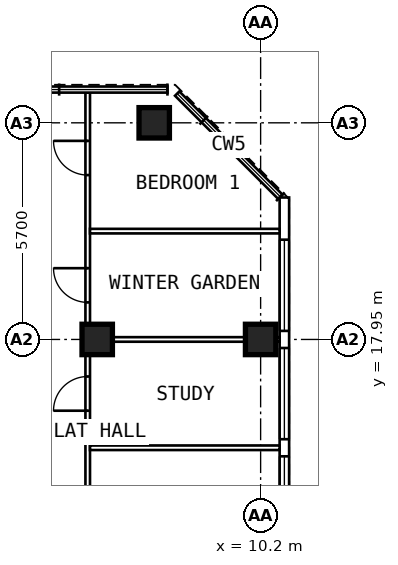
"""IFC4 building model, lengths in metres.
Left out: names, types, materials, properties, quantities, classifications, styles, units other than length and angle.
Written with IfcOpenShell. Run it as: python <this file> out.ifc"""

import sys

from ifc_helpers import new_model, si_unit, direction, frame, frame_2d, origin, origin_2d, place, context, subcontext, project, spatial, rectangle, extrude, element, fill, save


model = new_model("IFC4")
c1 = context("Model", 3, precision=1e-05, world=origin(), true_north=direction((0.0, 1.0)))
c2 = subcontext(c1, "Body", "Model", "MODEL_VIEW")
j1 = project(units=[si_unit("LENGTHUNIT", "METRE"), si_unit("PLANEANGLEUNIT", "RADIAN")], contexts=[c1])
p1 = place(None, origin())
s1 = spatial("IfcSite", under=j1, at=p1, CompositionType="ELEMENT")
p2 = place(p1, origin())
s2 = spatial("IfcBuilding", under=s1, at=p2, CompositionType="ELEMENT")
p3 = place(p2, frame((0.0, 0.0, 296.2)))
s3 = spatial("IfcBuildingStorey", under=s2, at=p3, CompositionType="ELEMENT", Elevation=296.2)
for number, where, z_axis, x_axis in (
    (1, (10.2, 17.95, 0.0), (0.0, 0.0, 1.0), (0.0, 1.0, 0.0)),
    (2, (7.4, 23.65, 0.0), (0.0, 0.0, 1.0), (0.0, 1.0, 0.0)),
    (3, (5.9, 17.95, 0.0), (0.0, 0.0, 1.0), (0.0, 1.0, 0.0)),
):
    element("IfcColumn", number, at=place(p3, frame(where, z_axis=z_axis, x_axis=x_axis)), inside=s3, PredefinedType="COLUMN", context=c2, shape_type="SweptSolid", body=[
        extrude(rectangle(XDim=0.8, YDim=0.8, at=origin_2d()), origin(), (0.0, 0.0, 1.0), 4.8),
    ])
p4 = place(p3, frame((10.825, 6.409, 0.0), z_axis=(0.0, 0.0, 1.0), x_axis=(0.0, 1.0, 0.0)))
e4 = element("IfcWall", 4, at=p4, inside=s3, PredefinedType="SOLIDWALL", context=c2, shape_type="SweptSolid", body=[
    extrude(rectangle(XDim=15.276, YDim=0.25, at=frame_2d((7.638, 0.0))), origin(), (0.0, 0.0, 1.0), 4.5),
])
p5 = place(p4, frame((0.366, 0.0, 0.6)))
e5 = element("IfcOpeningElement", 5, at=p5, cuts=e4, PredefinedType="OPENING", context=c2, shape_type="SweptSolid", body=[
    extrude(rectangle(XDim=2.4, YDim=2.0, at=frame_2d((1.2, 1.0))), frame((0.0, 0.137, 0.0), z_axis=(0.0, -1.0, 0.0), x_axis=(1.0, 0.0, 0.0)), (0.0, 0.0, 1.0), 0.274),
])
p6 = place(p4, frame((3.216, 0.0, 0.6)))
e6 = element("IfcOpeningElement", 6, at=p6, cuts=e4, PredefinedType="OPENING", context=c2, shape_type="SweptSolid", body=[
    extrude(rectangle(XDim=2.4, YDim=2.0, at=frame_2d((1.2, 1.0))), frame((0.0, 0.137, 0.0), z_axis=(0.0, -1.0, 0.0), x_axis=(1.0, 0.0, 0.0)), (0.0, 0.0, 1.0), 0.274),
])
p7 = place(p4, frame((6.066, 0.0, 0.6)))
e7 = element("IfcOpeningElement", 7, at=p7, cuts=e4, PredefinedType="OPENING", context=c2, shape_type="SweptSolid", body=[
    extrude(rectangle(XDim=2.4, YDim=2.0, at=frame_2d((1.2, 1.0))), frame((0.0, 0.137, 0.0), z_axis=(0.0, -1.0, 0.0), x_axis=(1.0, 0.0, 0.0)), (0.0, 0.0, 1.0), 0.274),
])
p8 = place(p4, frame((8.916, 0.0, 0.6)))
e8 = element("IfcOpeningElement", 8, at=p8, cuts=e4, PredefinedType="OPENING", context=c2, shape_type="SweptSolid", body=[
    extrude(rectangle(XDim=2.4, YDim=2.0, at=frame_2d((1.2, 1.0))), frame((0.0, 0.137, 0.0), z_axis=(0.0, -1.0, 0.0), x_axis=(1.0, 0.0, 0.0)), (0.0, 0.0, 1.0), 0.274),
])
p9 = place(p4, frame((11.766, 0.0, 0.6)))
e9 = element("IfcOpeningElement", 9, at=p9, cuts=e4, PredefinedType="OPENING", context=c2, shape_type="SweptSolid", body=[
    extrude(rectangle(XDim=2.4, YDim=2.0, at=frame_2d((1.2, 1.0))), frame((0.0, 0.137, 0.0), z_axis=(0.0, -1.0, 0.0), x_axis=(1.0, 0.0, 0.0)), (0.0, 0.0, 1.0), 0.274),
])
p10 = place(p3, frame((5.65, 9.6, 0.0), z_axis=(0.0, 0.0, 1.0), x_axis=(0.0, 1.0, 0.0)))
e10 = element("IfcWall", 10, at=p10, inside=s3, PredefinedType="PARTITIONING", context=c2, shape_type="SweptSolid", body=[
    extrude(rectangle(XDim=14.845, YDim=0.12, at=frame_2d((7.422, 0.0))), origin(), (0.0, 0.0, 1.0), 4.5),
])
p11 = place(p10, frame((3.2, 0.0, 0.0)))
e11 = element("IfcOpeningElement", 11, at=p11, cuts=e10, PredefinedType="OPENING", context=c2, shape_type="SweptSolid", body=[
    extrude(rectangle(XDim=0.9, YDim=2.1, at=frame_2d((0.45, 1.05))), frame((0.0, 0.072, 0.0), z_axis=(0.0, -1.0, 0.0), x_axis=(1.0, 0.0, 0.0)), (0.0, 0.0, 1.0), 0.144),
])
p12 = place(p10, frame((6.475, 0.0, 0.0)))
e12 = element("IfcOpeningElement", 12, at=p12, cuts=e10, PredefinedType="OPENING", context=c2, shape_type="SweptSolid", body=[
    extrude(rectangle(XDim=0.9, YDim=2.1, at=frame_2d((0.45, 1.05))), frame((0.0, 0.072, 0.0), z_axis=(0.0, -1.0, 0.0), x_axis=(1.0, 0.0, 0.0)), (0.0, 0.0, 1.0), 0.144),
])
p13 = place(p10, frame((9.325, 0.0, 0.0)))
e13 = element("IfcOpeningElement", 13, at=p13, cuts=e10, PredefinedType="OPENING", context=c2, shape_type="SweptSolid", body=[
    extrude(rectangle(XDim=0.9, YDim=2.1, at=frame_2d((0.45, 1.05))), frame((0.0, 0.072, 0.0), z_axis=(0.0, -1.0, 0.0), x_axis=(1.0, 0.0, 0.0)), (0.0, 0.0, 1.0), 0.144),
])
p14 = place(p10, frame((12.675, 0.0, 0.0)))
e14 = element("IfcOpeningElement", 14, at=p14, cuts=e10, PredefinedType="OPENING", context=c2, shape_type="SweptSolid", body=[
    extrude(rectangle(XDim=0.9, YDim=2.1, at=frame_2d((0.45, 1.05))), frame((0.0, 0.072, 0.0), z_axis=(0.0, -1.0, 0.0), x_axis=(1.0, 0.0, 0.0)), (0.0, 0.0, 1.0), 0.144),
])
p15 = place(p3, frame((5.71, 15.1, 0.0), z_axis=(0.0, 0.0, 1.0), x_axis=(1.0, 0.0, 0.0)))
e15 = element("IfcWall", 15, at=p15, inside=s3, PredefinedType="PARTITIONING", context=c2, shape_type="SweptSolid", body=[
    extrude(rectangle(XDim=4.99, YDim=0.12, at=frame_2d((2.495, 0.0))), origin(), (0.0, 0.0, 1.0), 4.5),
])
p16 = place(p3, frame((5.71, 17.95, 0.0), z_axis=(0.0, 0.0, 1.0), x_axis=(1.0, 0.0, 0.0)))
e16 = element("IfcWall", 16, at=p16, inside=s3, PredefinedType="PARTITIONING", context=c2, shape_type="SweptSolid", body=[
    extrude(rectangle(XDim=4.99, YDim=0.12, at=frame_2d((2.495, 0.0))), origin(), (0.0, 0.0, 1.0), 3.6),
])
p17 = place(p3, frame((5.71, 20.8, 0.0), z_axis=(0.0, 0.0, 1.0), x_axis=(1.0, 0.0, 0.0)))
e17 = element("IfcWall", 17, at=p17, inside=s3, PredefinedType="PARTITIONING", context=c2, shape_type="SweptSolid", body=[
    extrude(rectangle(XDim=4.99, YDim=0.12, at=frame_2d((2.495, 0.0))), origin(), (0.0, 0.0, 1.0), 4.5),
])
p18 = place(p7, origin())
e18 = element("IfcWindow", 18, at=p18, inside=s3, PartitioningType="SINGLE_PANEL", PredefinedType="WINDOW", context=c2, shape_type="SweptSolid", body=[
    extrude(rectangle(XDim=2.4, YDim=2.0, at=frame_2d((1.2, 1.0))), frame((0.0, 0.03, 0.0), z_axis=(0.0, -1.0, 0.0), x_axis=(1.0, 0.0, 0.0)), (0.0, 0.0, 1.0), 0.06),
])
fill(e7, e18)
p19 = place(p8, origin())
e19 = element("IfcWindow", 19, at=p19, inside=s3, PartitioningType="SINGLE_PANEL", PredefinedType="WINDOW", context=c2, shape_type="SweptSolid", body=[
    extrude(rectangle(XDim=2.4, YDim=2.0, at=frame_2d((1.2, 1.0))), frame((0.0, 0.03, 0.0), z_axis=(0.0, -1.0, 0.0), x_axis=(1.0, 0.0, 0.0)), (0.0, 0.0, 1.0), 0.06),
])
fill(e8, e19)
p20 = place(p9, origin())
e20 = element("IfcWindow", 20, at=p20, inside=s3, PartitioningType="SINGLE_PANEL", PredefinedType="WINDOW", context=c2, shape_type="SweptSolid", body=[
    extrude(rectangle(XDim=2.4, YDim=2.0, at=frame_2d((1.2, 1.0))), frame((0.0, 0.03, 0.0), z_axis=(0.0, -1.0, 0.0), x_axis=(1.0, 0.0, 0.0)), (0.0, 0.0, 1.0), 0.06),
])
fill(e9, e20)
p21 = place(p12, origin())
e21 = element("IfcDoor", 21, at=p21, inside=s3, OperationType="SINGLE_SWING_LEFT", PredefinedType="DOOR", context=c2, shape_type="SweptSolid", body=[
    extrude(rectangle(XDim=0.9, YDim=2.1, at=frame_2d((0.45, 1.05))), frame((0.0, 0.025, 0.0), z_axis=(0.0, -1.0, 0.0), x_axis=(1.0, 0.0, 0.0)), (0.0, 0.0, 1.0), 0.05),
])
fill(e12, e21)
p22 = place(p13, origin())
e22 = element("IfcDoor", 22, at=p22, inside=s3, OperationType="SINGLE_SWING_RIGHT", PredefinedType="DOOR", context=c2, shape_type="SweptSolid", body=[
    extrude(rectangle(XDim=0.9, YDim=2.1, at=frame_2d((0.45, 1.05))), frame((0.0, 0.025, 0.0), z_axis=(0.0, -1.0, 0.0), x_axis=(1.0, 0.0, 0.0)), (0.0, 0.0, 1.0), 0.05),
])
fill(e13, e22)
p23 = place(p14, origin())
e23 = element("IfcDoor", 23, at=p23, inside=s3, OperationType="SINGLE_SWING_RIGHT", PredefinedType="DOOR", context=c2, shape_type="SweptSolid", body=[
    extrude(rectangle(XDim=0.9, YDim=2.1, at=frame_2d((0.45, 1.05))), frame((0.0, 0.025, 0.0), z_axis=(0.0, -1.0, 0.0), x_axis=(1.0, 0.0, 0.0)), (0.0, 0.0, 1.0), 0.05),
])
fill(e14, e23)
save(model, sys.argv[1])
